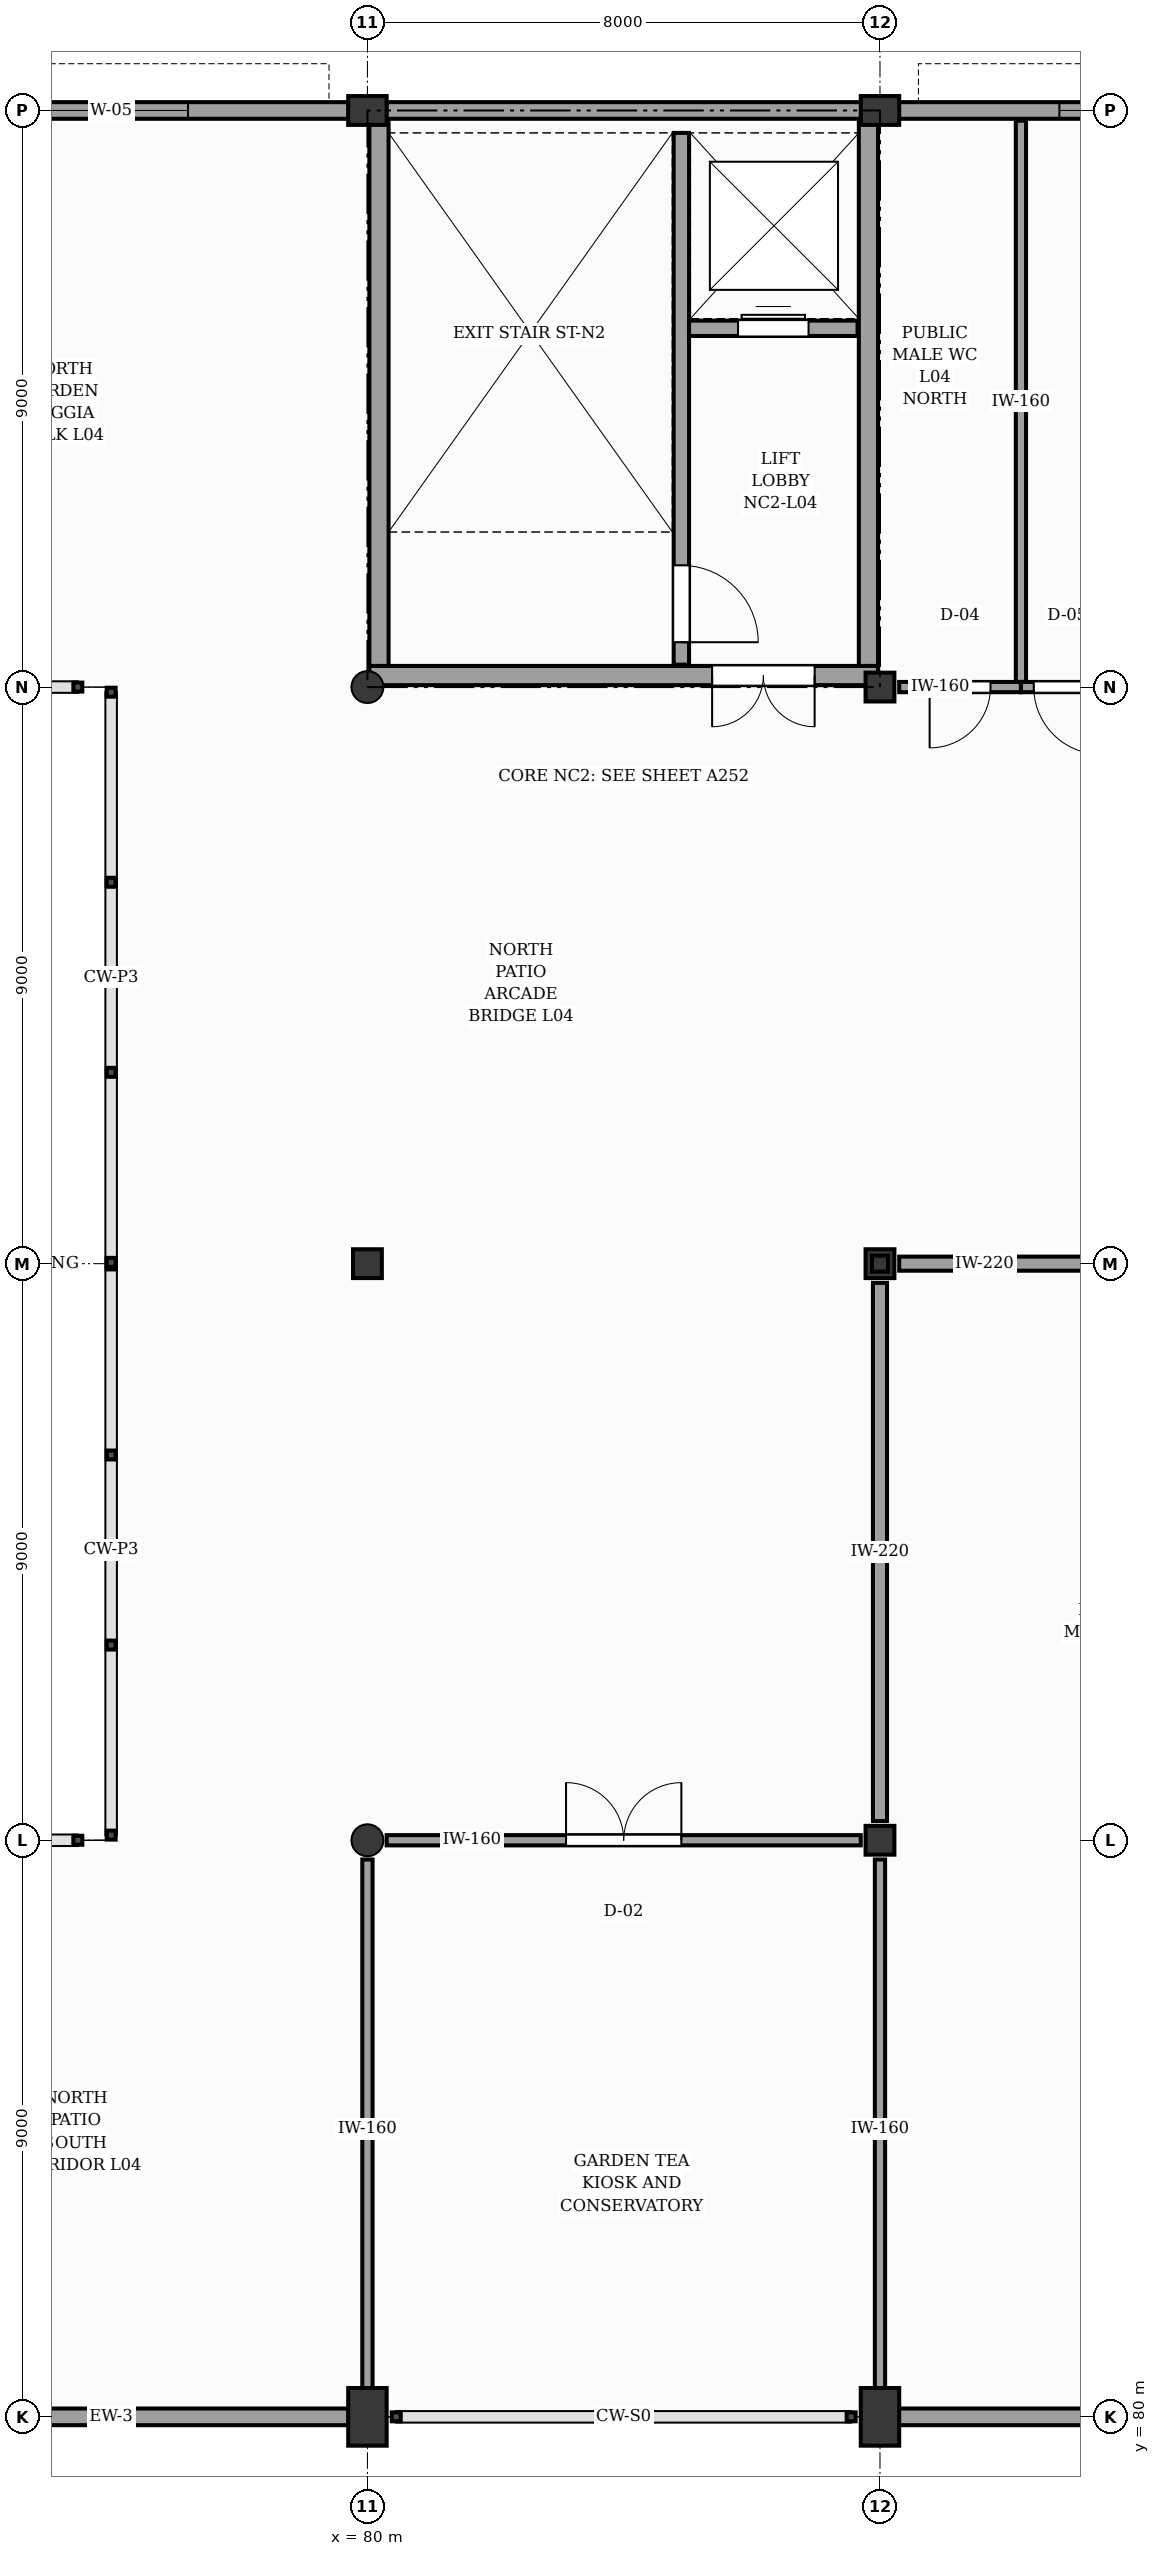
"""IFC4 building model, lengths in metres.
Left out: names, types, materials, properties, quantities, classifications, styles, units other than length and angle.
Written with IfcOpenShell. Run it as: python <this file> out.ifc"""

import sys

from ifc_helpers import new_model, si_unit, direction, frame, frame_2d, origin, origin_2d, place, context, subcontext, project, spatial, rectangle, circle, i_section, extrude, element, fill, save


model = new_model("IFC4")
c1 = context("Model", 3, precision=1e-05, world=origin(), true_north=direction((0.0, 1.0)))
c2 = subcontext(c1, "Body", "Model", "MODEL_VIEW")
j1 = project(units=[si_unit("LENGTHUNIT", "METRE"), si_unit("PLANEANGLEUNIT", "RADIAN")], contexts=[c1])
p1 = place(None, origin())
s1 = spatial("IfcSite", under=j1, at=p1, CompositionType="ELEMENT")
p2 = place(p1, origin())
s2 = spatial("IfcBuilding", under=s1, at=p2, CompositionType="ELEMENT")
p3 = place(p2, frame((0.0, 0.0, 20.4)))
s3 = spatial("IfcBuildingStorey", under=s2, at=p3, CompositionType="ELEMENT", Elevation=20.4)
p4 = place(p3, frame((80.0, 80.0, 0.0), z_axis=(0.0, 0.0, 1.0), x_axis=(1.0, 0.0, 0.0)))
e1 = element("IfcColumn", 1, at=p4, inside=s3, PredefinedType="COLUMN", context=c2, shape_type="SweptSolid", body=[
    extrude(rectangle(XDim=0.6, YDim=0.9, at=origin_2d()), origin(), (0.0, 0.0, 1.0), 4.2),
])
p5 = place(p3, frame((80.0, 89.0, 0.0), z_axis=(0.0, 0.0, 1.0), x_axis=(1.0, 0.0, 0.0)))
e2 = element("IfcColumn", 2, at=p5, inside=s3, PredefinedType="COLUMN", context=c2, shape_type="SweptSolid", body=[
    extrude(circle(Radius=0.25, at=origin_2d()), origin(), (0.0, 0.0, 1.0), 4.2),
])
p6 = place(p3, frame((80.0, 98.0, 0.0), z_axis=(0.0, 0.0, 1.0), x_axis=(1.0, 0.0, 0.0)))
e3 = element("IfcColumn", 3, at=p6, inside=s3, PredefinedType="COLUMN", context=c2, shape_type="SweptSolid", body=[
    extrude(rectangle(XDim=0.45, YDim=0.45, at=origin_2d()), origin(), (0.0, 0.0, 1.0), 4.2),
])
p7 = place(p3, frame((80.0, 107.0, 0.0), z_axis=(0.0, 0.0, 1.0), x_axis=(1.0, 0.0, 0.0)))
e4 = element("IfcColumn", 4, at=p7, inside=s3, PredefinedType="COLUMN", context=c2, shape_type="SweptSolid", body=[
    extrude(circle(Radius=0.25, at=origin_2d()), origin(), (0.0, 0.0, 1.0), 4.2),
])
p8 = place(p3, frame((80.0, 116.0, 0.0), z_axis=(0.0, 0.0, 1.0), x_axis=(1.0, 0.0, 0.0)))
e5 = element("IfcColumn", 5, at=p8, inside=s3, PredefinedType="PILASTER", context=c2, shape_type="SweptSolid", body=[
    extrude(rectangle(XDim=0.6, YDim=0.45, at=origin_2d()), origin(), (0.0, 0.0, 1.0), 4.2),
])
p9 = place(p3, frame((88.0, 80.0, 0.0), z_axis=(0.0, 0.0, 1.0), x_axis=(1.0, 0.0, 0.0)))
e6 = element("IfcColumn", 6, at=p9, inside=s3, PredefinedType="COLUMN", context=c2, shape_type="SweptSolid", body=[
    extrude(rectangle(XDim=0.6, YDim=0.9, at=origin_2d()), origin(), (0.0, 0.0, 1.0), 4.2),
])
for number, where, z_axis, x_axis in (
    (7, (88.0, 89.0, 0.0), (0.0, 0.0, 1.0), (1.0, 0.0, 0.0)),
    (8, (88.0, 98.0, 0.0), (0.0, 0.0, 1.0), (1.0, 0.0, 0.0)),
    (9, (88.0, 107.0, 0.0), (0.0, 0.0, 1.0), (1.0, 0.0, 0.0)),
):
    element("IfcColumn", number, at=place(p3, frame(where, z_axis=z_axis, x_axis=x_axis)), inside=s3, PredefinedType="COLUMN", context=c2, shape_type="SweptSolid", body=[
        extrude(rectangle(XDim=0.45, YDim=0.45, at=origin_2d()), origin(), (0.0, 0.0, 1.0), 4.2),
    ])
p10 = place(p3, frame((88.0, 116.0, 0.0), z_axis=(0.0, 0.0, 1.0), x_axis=(1.0, 0.0, 0.0)))
e10 = element("IfcColumn", 10, at=p10, inside=s3, PredefinedType="PILASTER", context=c2, shape_type="SweptSolid", body=[
    extrude(rectangle(XDim=0.6, YDim=0.45, at=origin_2d()), origin(), (0.0, 0.0, 1.0), 4.2),
])
p11 = place(p3, frame((88.0, 98.0, 4.2), z_axis=(0.0, 0.0, 1.0), x_axis=(1.0, 0.0, 0.0)))
e11 = element("IfcColumn", 11, at=p11, inside=s3, PredefinedType="COLUMN", context=c2, shape_type="SweptSolid", body=[
    extrude(i_section(OverallWidth=0.25, OverallDepth=0.25, WebThickness=0.009, FlangeThickness=0.01, FilletRadius=0.01, at=origin_2d()), origin(), (0.0, 0.0, 1.0), 3.5),
])
p12 = place(p3, frame((72.295, 116.0, 0.0), z_axis=(0.0, 0.0, 1.0), x_axis=(1.0, 0.0, 0.0)))
e12 = element("IfcWall", 12, at=p12, inside=s3, PredefinedType="SOLIDWALL", context=c2, shape_type="SweptSolid", body=[
    extrude(rectangle(XDim=7.41, YDim=0.26, at=frame_2d((3.705, 0.0))), origin(), (0.0, 0.0, 1.0), 3.21),
])
p13 = place(p12, frame((2.505, 0.0, 0.9)))
e13 = element("IfcOpeningElement", 13, at=p13, cuts=e12, PredefinedType="OPENING", context=c2, shape_type="SweptSolid", body=[
    extrude(rectangle(XDim=2.4, YDim=1.99, at=frame_2d((1.2, 0.995))), frame((0.0, 0.14, 0.0), z_axis=(0.0, -1.0, 0.0), x_axis=(1.0, 0.0, 0.0)), (0.0, 0.0, 1.0), 0.28),
])
p14 = place(p3, frame((72.295, 80.0, 0.0), z_axis=(0.0, 0.0, 1.0), x_axis=(1.0, 0.0, 0.0)))
e14 = element("IfcWall", 14, at=p14, inside=s3, PredefinedType="SOLIDWALL", context=c2, shape_type="SweptSolid", body=[
    extrude(rectangle(XDim=7.41, YDim=0.26, at=frame_2d((3.705, 0.0))), origin(), (0.0, 0.0, 1.0), 2.96),
])
p15 = place(p3, frame((80.295, 116.0, 0.0), z_axis=(0.0, 0.0, 1.0), x_axis=(1.0, 0.0, 0.0)))
e15 = element("IfcWall", 15, at=p15, inside=s3, PredefinedType="SOLIDWALL", context=c2, shape_type="SweptSolid", body=[
    extrude(rectangle(XDim=7.41, YDim=0.26, at=frame_2d((3.705, 0.0))), origin(), (0.0, 0.0, 1.0), 3.21),
])
p16 = place(p3, frame((88.295, 116.0, 0.0), z_axis=(0.0, 0.0, 1.0), x_axis=(1.0, 0.0, 0.0)))
e16 = element("IfcWall", 16, at=p16, inside=s3, PredefinedType="SOLIDWALL", context=c2, shape_type="SweptSolid", body=[
    extrude(rectangle(XDim=7.41, YDim=0.26, at=frame_2d((3.705, 0.0))), origin(), (0.0, 0.0, 1.0), 3.21),
])
p17 = place(p16, frame((2.505, 0.0, 0.9)))
e17 = element("IfcOpeningElement", 17, at=p17, cuts=e16, PredefinedType="OPENING", context=c2, shape_type="SweptSolid", body=[
    extrude(rectangle(XDim=2.4, YDim=1.99, at=frame_2d((1.2, 0.995))), frame((0.0, 0.14, 0.0), z_axis=(0.0, -1.0, 0.0), x_axis=(1.0, 0.0, 0.0)), (0.0, 0.0, 1.0), 0.28),
])
p18 = place(p3, frame((88.295, 80.0, 0.0), z_axis=(0.0, 0.0, 1.0), x_axis=(1.0, 0.0, 0.0)))
e18 = element("IfcWall", 18, at=p18, inside=s3, PredefinedType="SOLIDWALL", context=c2, shape_type="SweptSolid", body=[
    extrude(rectangle(XDim=7.41, YDim=0.26, at=frame_2d((3.705, 0.0))), origin(), (0.0, 0.0, 1.0), 2.96),
])
p19 = place(p3, frame((84.9, 107.35, 0.0), z_axis=(0.0, 0.0, 1.0), x_axis=(0.0, 1.0, 0.0)))
e19 = element("IfcWall", 19, at=p19, inside=s3, PredefinedType="SHEAR", context=c2, shape_type="SweptSolid", body=[
    extrude(rectangle(XDim=8.3, YDim=0.24, at=frame_2d((4.15, 0.0))), origin(), (0.0, 0.0, 1.0), 3.98),
])
p20 = place(p19, frame((0.35, 0.0, 0.0)))
e20 = element("IfcOpeningElement", 20, at=p20, cuts=e19, PredefinedType="OPENING", context=c2, shape_type="SweptSolid", body=[
    extrude(rectangle(XDim=1.2, YDim=2.15, at=frame_2d((0.6, 1.075))), frame((0.0, 0.13, 0.0), z_axis=(0.0, -1.0, 0.0), x_axis=(1.0, 0.0, 0.0)), (0.0, 0.0, 1.0), 0.26),
])
p21 = place(p3, frame((85.02, 112.6, 0.0), z_axis=(0.0, 0.0, 1.0), x_axis=(1.0, 0.0, 0.0)))
e21 = element("IfcWall", 21, at=p21, inside=s3, PredefinedType="SHEAR", context=c2, shape_type="SweptSolid", body=[
    extrude(rectangle(XDim=2.63, YDim=0.24, at=frame_2d((1.315, 0.0))), origin(), (0.0, 0.0, 1.0), 3.98),
])
p22 = place(p21, frame((0.765, 0.0, 0.0)))
e22 = element("IfcOpeningElement", 22, at=p22, cuts=e21, PredefinedType="OPENING", context=c2, shape_type="SweptSolid", body=[
    extrude(rectangle(XDim=1.1, YDim=2.15, at=frame_2d((0.55, 1.075))), frame((0.0, 0.13, 0.0), z_axis=(0.0, -1.0, 0.0), x_axis=(1.0, 0.0, 0.0)), (0.0, 0.0, 1.0), 0.26),
])
for number, where, z_axis, x_axis in (
    (23, (80.18, 107.18, 0.0), (0.0, 0.0, 1.0), (0.0, 1.0, 0.0)),
    (24, (87.82, 107.18, 0.0), (0.0, 0.0, 1.0), (0.0, 1.0, 0.0)),
):
    element("IfcWall", number, at=place(p3, frame(where, z_axis=z_axis, x_axis=x_axis)), inside=s3, PredefinedType="SHEAR", context=c2, shape_type="SweptSolid", body=[
        extrude(rectangle(XDim=8.64, YDim=0.3, at=frame_2d((4.32, 0.0))), origin(), (0.0, 0.0, 1.0), 3.98),
    ])
p23 = place(p3, frame((80.03, 107.18, 0.0), z_axis=(0.0, 0.0, 1.0), x_axis=(1.0, 0.0, 0.0)))
e25 = element("IfcWall", 25, at=p23, inside=s3, PredefinedType="SHEAR", context=c2, shape_type="SweptSolid", body=[
    extrude(rectangle(XDim=7.94, YDim=0.3, at=frame_2d((3.97, 0.0))), origin(), (0.0, 0.0, 1.0), 3.98),
])
p24 = place(p23, frame((5.35, 0.0, 0.0)))
e26 = element("IfcOpeningElement", 26, at=p24, cuts=e25, PredefinedType="OPENING", context=c2, shape_type="SweptSolid", body=[
    extrude(rectangle(XDim=1.6, YDim=2.15, at=frame_2d((0.8, 1.075))), frame((0.0, 0.16, 0.0), z_axis=(0.0, -1.0, 0.0), x_axis=(1.0, 0.0, 0.0)), (0.0, 0.0, 1.0), 0.32),
])
p25 = place(p3, frame((80.3, 89.0, 0.0), z_axis=(0.0, 0.0, 1.0), x_axis=(1.0, 0.0, 0.0)))
e27 = element("IfcWall", 27, at=p25, inside=s3, PredefinedType="PARTITIONING", context=c2, shape_type="SweptSolid", body=[
    extrude(rectangle(XDim=7.4, YDim=0.16, at=frame_2d((3.7, 0.0))), origin(), (0.0, 0.0, 1.0), 3.1),
])
p26 = place(p25, frame((2.8, 0.0, 0.0)))
e28 = element("IfcOpeningElement", 28, at=p26, cuts=e27, PredefinedType="OPENING", context=c2, shape_type="SweptSolid", body=[
    extrude(rectangle(XDim=1.8, YDim=2.25, at=frame_2d((0.9, 1.125))), frame((0.0, 0.09, 0.0), z_axis=(0.0, -1.0, 0.0), x_axis=(1.0, 0.0, 0.0)), (0.0, 0.0, 1.0), 0.18),
])
for number, where, z_axis, x_axis in (
    (29, (80.0, 80.3, 0.0), (0.0, 0.0, 1.0), (0.0, 1.0, 0.0)),
    (30, (88.0, 80.3, 0.0), (0.0, 0.0, 1.0), (0.0, 1.0, 0.0)),
):
    element("IfcWall", number, at=place(p3, frame(where, z_axis=z_axis, x_axis=x_axis)), inside=s3, PredefinedType="PARTITIONING", context=c2, shape_type="SweptSolid", body=[
        extrude(rectangle(XDim=8.4, YDim=0.16, at=frame_2d((4.2, 0.0))), origin(), (0.0, 0.0, 1.0), 2.96),
    ])
p27 = place(p3, frame((88.3, 107.0, 0.0), z_axis=(0.0, 0.0, 1.0), x_axis=(1.0, 0.0, 0.0)))
e31 = element("IfcWall", 31, at=p27, inside=s3, PredefinedType="PARTITIONING", context=c2, shape_type="SweptSolid", body=[
    extrude(rectangle(XDim=1.9, YDim=0.16, at=frame_2d((0.95, 0.0))), origin(), (0.0, 0.0, 1.0), 3.1),
])
p28 = place(p27, frame((0.475, 0.0, 0.0)))
e32 = element("IfcOpeningElement", 32, at=p28, cuts=e31, PredefinedType="OPENING", context=c2, shape_type="SweptSolid", body=[
    extrude(rectangle(XDim=0.95, YDim=2.1, at=frame_2d((0.475, 1.05))), frame((0.0, 0.09, 0.0), z_axis=(0.0, -1.0, 0.0), x_axis=(1.0, 0.0, 0.0)), (0.0, 0.0, 1.0), 0.18),
])
p29 = place(p3, frame((90.2, 107.08, 0.0), z_axis=(0.0, 0.0, 1.0), x_axis=(0.0, 1.0, 0.0)))
e33 = element("IfcWall", 33, at=p29, inside=s3, PredefinedType="PARTITIONING", context=c2, shape_type="SweptSolid", body=[
    extrude(rectangle(XDim=8.76, YDim=0.16, at=frame_2d((4.38, 0.0))), origin(), (0.0, 0.0, 1.0), 3.1),
])
p30 = place(p3, frame((90.2, 107.0, 0.0), z_axis=(0.0, 0.0, 1.0), x_axis=(1.0, 0.0, 0.0)))
e34 = element("IfcWall", 34, at=p30, inside=s3, PredefinedType="PARTITIONING", context=c2, shape_type="SweptSolid", body=[
    extrude(rectangle(XDim=5.5, YDim=0.16, at=frame_2d((2.75, 0.0))), origin(), (0.0, 0.0, 1.0), 3.1),
])
p31 = place(p30, frame((0.2, 0.0, 0.0)))
e35 = element("IfcOpeningElement", 35, at=p31, cuts=e34, PredefinedType="OPENING", context=c2, shape_type="SweptSolid", body=[
    extrude(rectangle(XDim=1.05, YDim=2.1, at=frame_2d((0.525, 1.05))), frame((0.0, 0.09, 0.0), z_axis=(0.0, -1.0, 0.0), x_axis=(1.0, 0.0, 0.0)), (0.0, 0.0, 1.0), 0.18),
])
p32 = place(p3, frame((88.3, 98.0, 0.0), z_axis=(0.0, 0.0, 1.0), x_axis=(1.0, 0.0, 0.0)))
e36 = element("IfcWall", 36, at=p32, inside=s3, PredefinedType="SOLIDWALL", context=c2, shape_type="SweptSolid", body=[
    extrude(rectangle(XDim=7.4, YDim=0.22, at=frame_2d((3.7, 0.0))), origin(), (0.0, 0.0, 1.0), 3.1),
])
p33 = place(p32, frame((3.15, 0.0, 0.0)))
e37 = element("IfcOpeningElement", 37, at=p33, cuts=e36, PredefinedType="OPENING", context=c2, shape_type="SweptSolid", body=[
    extrude(rectangle(XDim=1.1, YDim=2.15, at=frame_2d((0.55, 1.075))), frame((0.0, 0.12, 0.0), z_axis=(0.0, -1.0, 0.0), x_axis=(1.0, 0.0, 0.0)), (0.0, 0.0, 1.0), 0.24),
])
p34 = place(p3, frame((88.0, 89.3, 0.0), z_axis=(0.0, 0.0, 1.0), x_axis=(0.0, 1.0, 0.0)))
e38 = element("IfcWall", 38, at=p34, inside=s3, PredefinedType="SOLIDWALL", context=c2, shape_type="SweptSolid", body=[
    extrude(rectangle(XDim=8.4, YDim=0.22, at=frame_2d((4.2, 0.0))), origin(), (0.0, 0.0, 1.0), 3.1),
])
p35 = place(p13, origin())
e39 = element("IfcWindow", 39, at=p35, inside=s3, PartitioningType="SINGLE_PANEL", PredefinedType="WINDOW", context=c2, shape_type="SweptSolid", body=[
    extrude(rectangle(XDim=2.4, YDim=1.99, at=frame_2d((1.2, 0.995))), frame((0.0, 0.03, 0.0), z_axis=(0.0, -1.0, 0.0), x_axis=(1.0, 0.0, 0.0)), (0.0, 0.0, 1.0), 0.06),
])
fill(e13, e39)
p36 = place(p17, origin())
e40 = element("IfcWindow", 40, at=p36, inside=s3, PartitioningType="SINGLE_PANEL", PredefinedType="WINDOW", context=c2, shape_type="SweptSolid", body=[
    extrude(rectangle(XDim=2.4, YDim=1.99, at=frame_2d((1.2, 0.995))), frame((0.0, 0.03, 0.0), z_axis=(0.0, -1.0, 0.0), x_axis=(1.0, 0.0, 0.0)), (0.0, 0.0, 1.0), 0.06),
])
fill(e17, e40)
p37 = place(p20, frame((1.2, 0.0, 0.0), z_axis=(0.0, 0.0, 1.0), x_axis=(-1.0, 0.0, 0.0)))
e41 = element("IfcDoor", 41, at=p37, inside=s3, OperationType="SINGLE_SWING_LEFT", PredefinedType="DOOR", context=c2, shape_type="SweptSolid", body=[
    extrude(rectangle(XDim=1.2, YDim=2.15, at=frame_2d((0.6, 1.075))), frame((0.0, 0.025, 0.0), z_axis=(0.0, -1.0, 0.0), x_axis=(1.0, 0.0, 0.0)), (0.0, 0.0, 1.0), 0.05),
])
fill(e20, e41)
p38 = place(p22, origin())
e42 = element("IfcDoor", 42, at=p38, inside=s3, OperationType="DOUBLE_DOOR_SLIDING", PredefinedType="DOOR", context=c2, shape_type="SweptSolid", body=[
    extrude(rectangle(XDim=1.1, YDim=2.15, at=frame_2d((0.55, 1.075))), frame((0.0, 0.025, 0.0), z_axis=(0.0, -1.0, 0.0), x_axis=(1.0, 0.0, 0.0)), (0.0, 0.0, 1.0), 0.05),
])
fill(e22, e42)
p39 = place(p24, frame((1.6, 0.0, 0.0), z_axis=(0.0, 0.0, 1.0), x_axis=(-1.0, 0.0, 0.0)))
e43 = element("IfcDoor", 43, at=p39, inside=s3, OperationType="DOUBLE_DOOR_SINGLE_SWING", PredefinedType="DOOR", context=c2, shape_type="SweptSolid", body=[
    extrude(rectangle(XDim=1.6, YDim=2.15, at=frame_2d((0.8, 1.075))), frame((0.0, 0.025, 0.0), z_axis=(0.0, -1.0, 0.0), x_axis=(1.0, 0.0, 0.0)), (0.0, 0.0, 1.0), 0.05),
])
fill(e26, e43)
p40 = place(p26, origin())
e44 = element("IfcDoor", 44, at=p40, inside=s3, OperationType="DOUBLE_DOOR_SINGLE_SWING", PredefinedType="DOOR", context=c2, shape_type="SweptSolid", body=[
    extrude(rectangle(XDim=1.8, YDim=2.25, at=frame_2d((0.9, 1.125))), frame((0.0, 0.025, 0.0), z_axis=(0.0, -1.0, 0.0), x_axis=(1.0, 0.0, 0.0)), (0.0, 0.0, 1.0), 0.05),
])
fill(e28, e44)
p41 = place(p28, frame((0.95, 0.0, 0.0), z_axis=(0.0, 0.0, 1.0), x_axis=(-1.0, 0.0, 0.0)))
e45 = element("IfcDoor", 45, at=p41, inside=s3, OperationType="SINGLE_SWING_LEFT", PredefinedType="DOOR", context=c2, shape_type="SweptSolid", body=[
    extrude(rectangle(XDim=0.95, YDim=2.1, at=frame_2d((0.475, 1.05))), frame((0.0, 0.025, 0.0), z_axis=(0.0, -1.0, 0.0), x_axis=(1.0, 0.0, 0.0)), (0.0, 0.0, 1.0), 0.05),
])
fill(e32, e45)
p42 = place(p31, frame((1.05, 0.0, 0.0), z_axis=(0.0, 0.0, 1.0), x_axis=(-1.0, 0.0, 0.0)))
e46 = element("IfcDoor", 46, at=p42, inside=s3, OperationType="SINGLE_SWING_RIGHT", PredefinedType="DOOR", context=c2, shape_type="SweptSolid", body=[
    extrude(rectangle(XDim=1.05, YDim=2.1, at=frame_2d((0.525, 1.05))), frame((0.0, 0.025, 0.0), z_axis=(0.0, -1.0, 0.0), x_axis=(1.0, 0.0, 0.0)), (0.0, 0.0, 1.0), 0.05),
])
fill(e35, e46)
save(model, sys.argv[1])
